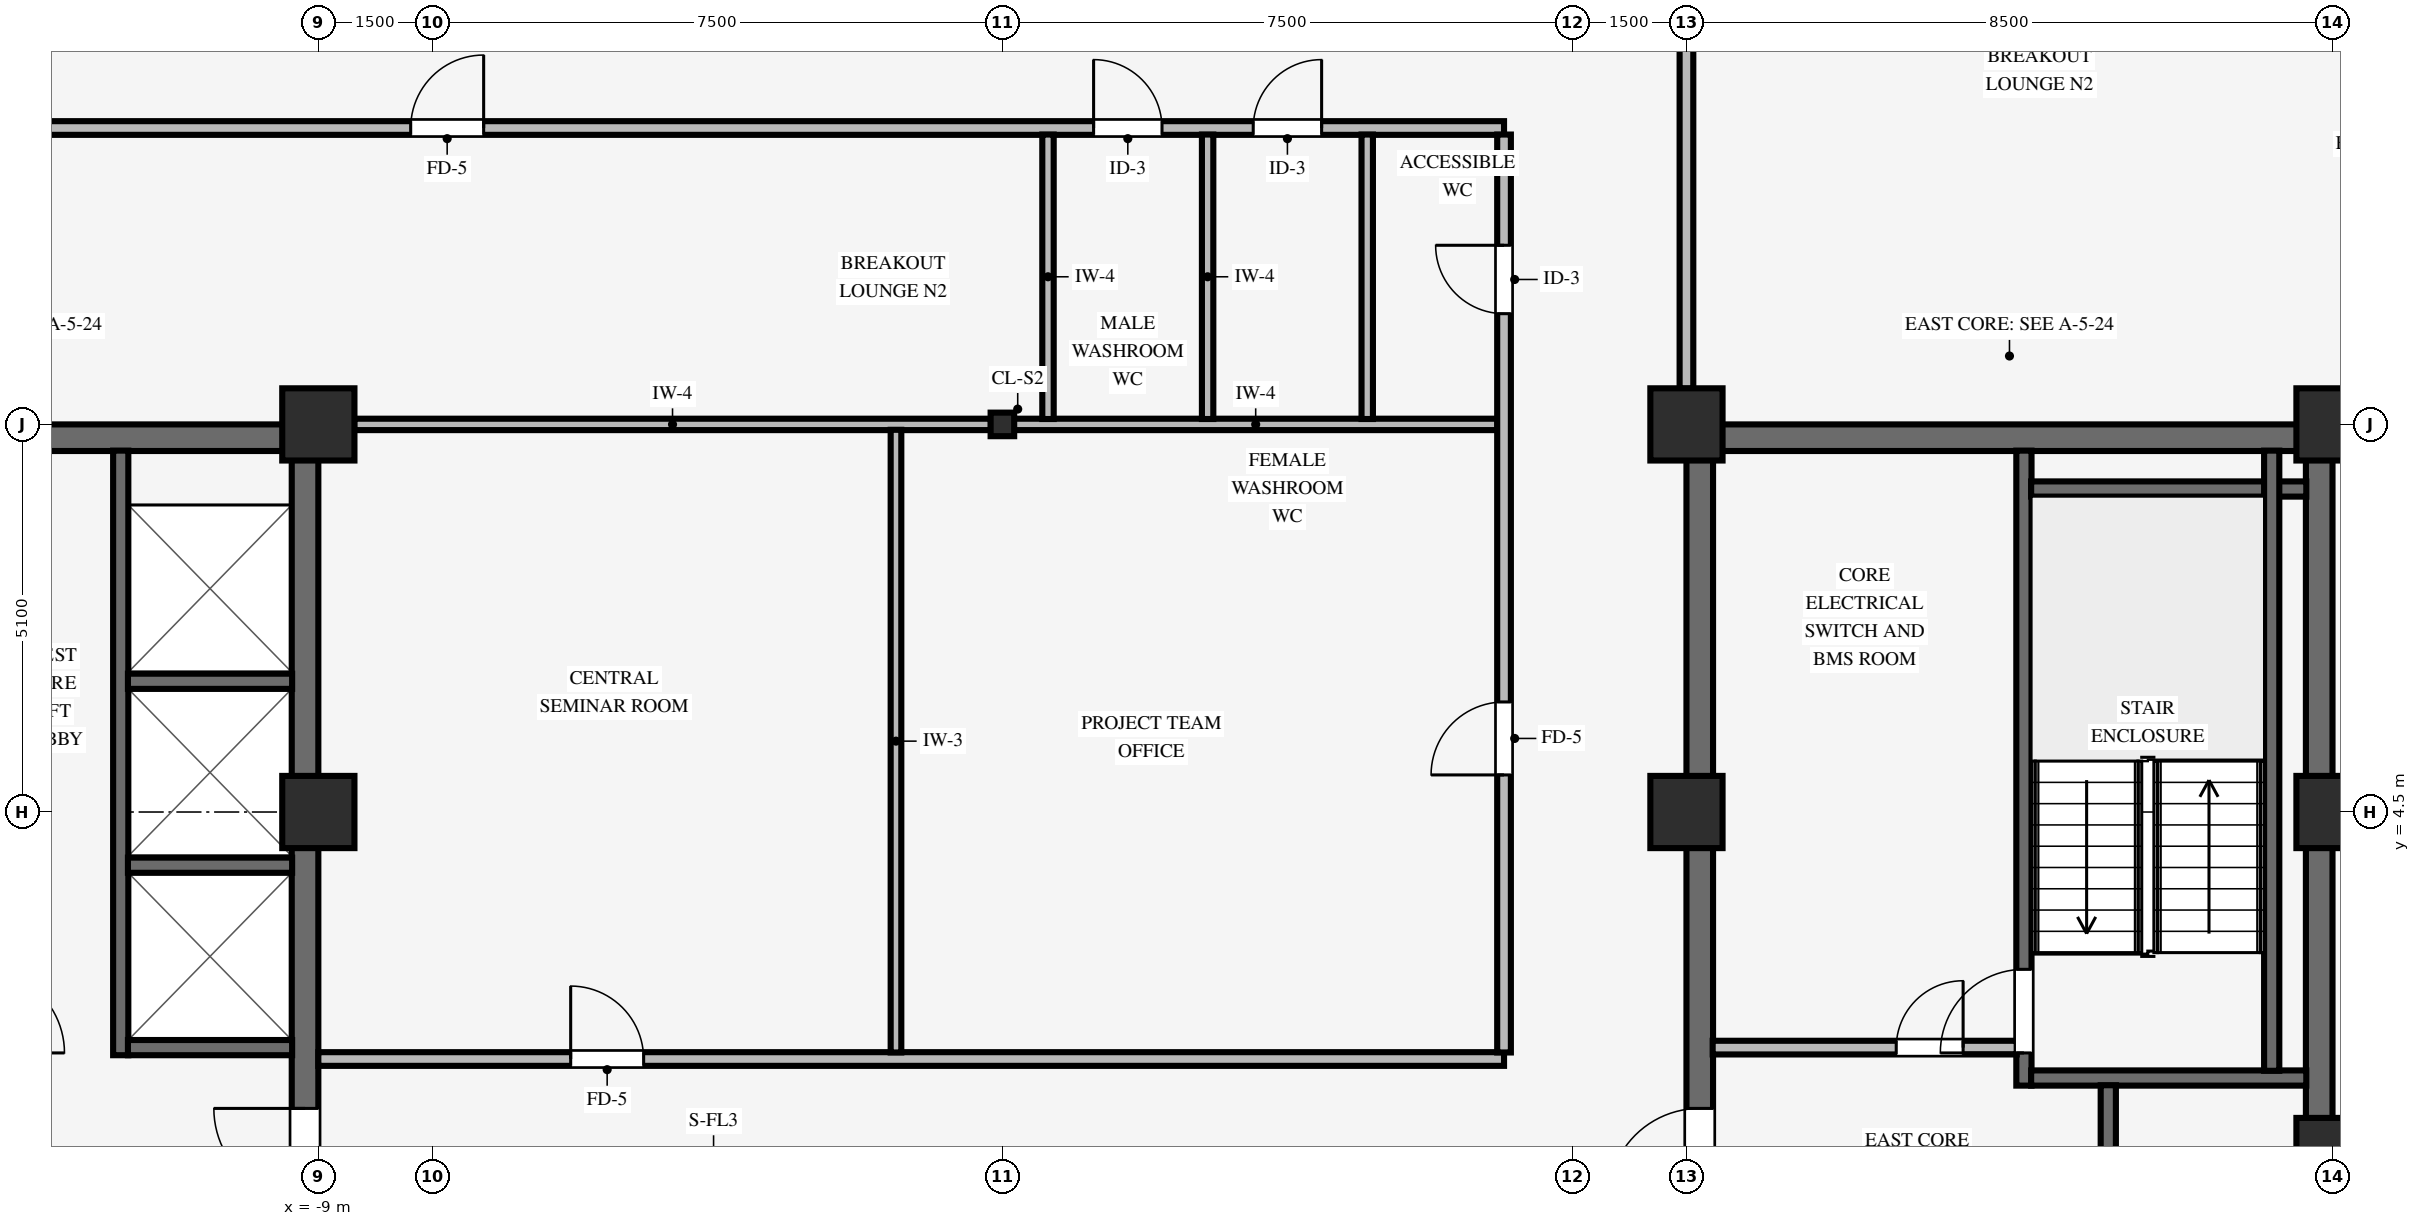
"""IFC4 building model, lengths in metres.
Left out: names, types, materials, properties, quantities, classifications, styles, units other than length and angle.
Written with IfcOpenShell. Run it as: python <this file> out.ifc"""

import sys

from ifc_helpers import new_model, si_unit, direction, frame, frame_2d, origin, origin_2d, place, context, subcontext, project, spatial, rectangle, i_section, extrude, source, transform, mapped, element, fill, save


model = new_model("IFC4")
c1 = context("Model", 3, precision=1e-05, world=origin(), true_north=direction((0.0, 1.0)))
c2 = subcontext(c1, "Body", "Model", "MODEL_VIEW")
j1 = project(units=[si_unit("LENGTHUNIT", "METRE"), si_unit("PLANEANGLEUNIT", "RADIAN")], contexts=[c1])
p1 = place(None, origin())
s1 = spatial("IfcSite", under=j1, at=p1, CompositionType="ELEMENT")
p2 = place(p1, origin())
s2 = spatial("IfcBuilding", under=s1, at=p2, CompositionType="ELEMENT")
p3 = place(p2, frame((0.0, 0.0, 209.15)))
s3 = spatial("IfcBuildingStorey", under=s2, at=p3, CompositionType="ELEMENT", Elevation=209.15)
p4 = place(p3, frame((-17.5, 9.425, 0.0), z_axis=(0.0, 0.0, 1.0), x_axis=(1.0, 0.0, 0.0)))
e1 = element("IfcWall", 1, at=p4, inside=s3, PredefinedType="SHEAR", context=c2, shape_type="SweptSolid", body=[
    extrude(rectangle(XDim=8.5, YDim=0.35, at=frame_2d((4.25, 0.0))), origin(), (0.0, 0.0, 1.0), 3.37),
])
p5 = place(p3, frame((-9.175, -9.255, 0.0), z_axis=(0.0, 0.0, 1.0), x_axis=(0.0, 1.0, 0.0)))
e2 = element("IfcWall", 2, at=p5, inside=s3, PredefinedType="SHEAR", context=c2, shape_type="SweptSolid", body=[
    extrude(rectangle(XDim=18.51, YDim=0.35, at=frame_2d((9.255, 0.0))), origin(), (0.0, 0.0, 1.0), 3.37),
])
p6 = place(p5, frame((8.655, 0.0, 0.0)))
e3 = element("IfcOpeningElement", 3, at=p6, cuts=e2, PredefinedType="OPENING", context=c2, shape_type="SweptSolid", body=[
    extrude(rectangle(XDim=1.2, YDim=2.15, at=frame_2d((0.6, 1.075))), frame((0.0, 0.185, 0.0), z_axis=(0.0, -1.0, 0.0), x_axis=(1.0, 0.0, 0.0)), (0.0, 0.0, 1.0), 0.37),
])
p7 = place(p3, frame((9.0, 9.425, 0.0), z_axis=(0.0, 0.0, 1.0), x_axis=(1.0, 0.0, 0.0)))
e4 = element("IfcWall", 4, at=p7, inside=s3, PredefinedType="SHEAR", context=c2, shape_type="SweptSolid", body=[
    extrude(rectangle(XDim=8.5, YDim=0.35, at=frame_2d((4.25, 0.0))), origin(), (0.0, 0.0, 1.0), 3.37),
])
p8 = place(p3, frame((9.175, -9.255, 0.0), z_axis=(0.0, 0.0, 1.0), x_axis=(0.0, 1.0, 0.0)))
e5 = element("IfcWall", 5, at=p8, inside=s3, PredefinedType="SHEAR", context=c2, shape_type="SweptSolid", body=[
    extrude(rectangle(XDim=18.51, YDim=0.35, at=frame_2d((9.255, 0.0))), origin(), (0.0, 0.0, 1.0), 3.37),
])
p9 = place(p8, frame((8.655, 0.0, 0.0)))
e6 = element("IfcOpeningElement", 6, at=p9, cuts=e5, PredefinedType="OPENING", context=c2, shape_type="SweptSolid", body=[
    extrude(rectangle(XDim=1.2, YDim=2.15, at=frame_2d((0.6, 1.075))), frame((0.0, 0.185, 0.0), z_axis=(0.0, -1.0, 0.0), x_axis=(1.0, 0.0, 0.0)), (0.0, 0.0, 1.0), 0.37),
])
p10 = place(p3, frame((17.325, -9.255, 0.0), z_axis=(0.0, 0.0, 1.0), x_axis=(0.0, 1.0, 0.0)))
e7 = element("IfcWall", 7, at=p10, inside=s3, PredefinedType="SHEAR", context=c2, shape_type="SweptSolid", body=[
    extrude(rectangle(XDim=18.51, YDim=0.35, at=frame_2d((9.255, 0.0))), origin(), (0.0, 0.0, 1.0), 3.37),
])
for number, where, z_axis, x_axis in (
    (8, (-9.0, 4.5, 0.0), (0.0, 0.0, 1.0), (1.0, 0.0, 0.0)),
    (9, (-9.0, 9.6, 0.0), (0.0, 0.0, 1.0), (1.0, 0.0, 0.0)),
    (10, (9.0, 4.5, 0.0), (0.0, 0.0, 1.0), (1.0, 0.0, 0.0)),
    (11, (9.0, 9.6, 0.0), (0.0, 0.0, 1.0), (1.0, 0.0, 0.0)),
    (12, (17.5, 4.5, 0.0), (0.0, 0.0, 1.0), (1.0, 0.0, 0.0)),
    (13, (17.5, 9.6, 0.0), (0.0, 0.0, 1.0), (1.0, 0.0, 0.0)),
    (14, (17.5, 0.0, 0.0), (0.0, 0.0, 1.0), (1.0, 0.0, 0.0)),
):
    element("IfcColumn", number, at=place(p3, frame(where, z_axis=z_axis, x_axis=x_axis)), inside=s3, PredefinedType="COLUMN", context=c2, shape_type="SweptSolid", body=[
        extrude(rectangle(XDim=0.95, YDim=0.95, at=origin_2d()), origin(), (0.0, 0.0, 1.0), 3.37),
    ])
p11 = place(p3, frame((0.0, 9.6, 0.0), z_axis=(0.0, 0.0, 1.0), x_axis=(1.0, 0.0, 0.0)))
e15 = element("IfcColumn", 15, at=p11, inside=s3, PredefinedType="COLUMN", context=c2, shape_type="SweptSolid", body=[
    extrude(i_section(OverallWidth=0.31, OverallDepth=0.31, WebThickness=0.015, FlangeThickness=0.015, FilletRadius=0.015, at=origin_2d()), origin(), (0.0, 0.0, 1.0), 3.37),
])
p12 = place(p3, frame((-11.6, 1.3, 0.0), z_axis=(0.0, 0.0, 1.0), x_axis=(0.0, 1.0, 0.0)))
e16 = element("IfcWall", 16, at=p12, inside=s3, PredefinedType="SHEAR", context=c2, shape_type="SweptSolid", body=[
    extrude(rectangle(XDim=7.955, YDim=0.2, at=frame_2d((3.978, 0.0))), origin(), (0.0, 0.0, 1.0), 3.37),
])
for number, where, z_axis, x_axis in (
    (17, (-11.505, 1.4, 0.0), (0.0, 0.0, 1.0), (1.0, 0.0, 0.0)),
    (18, (-11.505, 3.8, 0.0), (0.0, 0.0, 1.0), (1.0, 0.0, 0.0)),
    (19, (-11.505, 6.22, 0.0), (0.0, 0.0, 1.0), (1.0, 0.0, 0.0)),
):
    element("IfcWall", number, at=place(p3, frame(where, z_axis=z_axis, x_axis=x_axis)), inside=s3, PredefinedType="SHEAR", context=c2, shape_type="SweptSolid", body=[
        extrude(rectangle(XDim=2.16, YDim=0.2, at=frame_2d((1.08, 0.0))), origin(), (0.0, 0.0, 1.0), 3.37),
    ])
p13 = place(p3, frame((13.44, 0.9, 0.0), z_axis=(0.0, 0.0, 1.0), x_axis=(0.0, 1.0, 0.0)))
e20 = element("IfcWall", 20, at=p13, inside=s3, PredefinedType="SHEAR", context=c2, shape_type="SweptSolid", body=[
    extrude(rectangle(XDim=8.355, YDim=0.2, at=frame_2d((4.177, 0.0))), origin(), (0.0, 0.0, 1.0), 3.37),
])
p14 = place(p13, frame((0.43, 0.0, 0.0)))
e21 = element("IfcOpeningElement", 21, at=p14, cuts=e20, PredefinedType="OPENING", context=c2, shape_type="SweptSolid", body=[
    extrude(rectangle(XDim=1.1, YDim=2.15, at=frame_2d((0.55, 1.075))), frame((0.0, 0.11, 0.0), z_axis=(0.0, -1.0, 0.0), x_axis=(1.0, 0.0, 0.0)), (0.0, 0.0, 1.0), 0.22),
])
for number, where, z_axis, x_axis in (
    (22, (13.535, 1.0, 0.0), (0.0, 0.0, 1.0), (1.0, 0.0, 0.0)),
    (23, (13.535, 8.75, 0.0), (0.0, 0.0, 1.0), (1.0, 0.0, 0.0)),
):
    element("IfcWall", number, at=place(p3, frame(where, z_axis=z_axis, x_axis=x_axis)), inside=s3, PredefinedType="SHEAR", context=c2, shape_type="SweptSolid", body=[
        extrude(rectangle(XDim=3.62, YDim=0.2, at=frame_2d((1.81, 0.0))), origin(), (0.0, 0.0, 1.0), 3.37),
    ])
p15 = place(p3, frame((16.7, 1.095, 0.0), z_axis=(0.0, 0.0, 1.0), x_axis=(0.0, 1.0, 0.0)))
e24 = element("IfcWall", 24, at=p15, inside=s3, PredefinedType="SHEAR", context=c2, shape_type="SweptSolid", body=[
    extrude(rectangle(XDim=8.16, YDim=0.2, at=frame_2d((4.08, 0.0))), origin(), (0.0, 0.0, 1.0), 3.37),
])
p16 = place(p3, frame((14.55, -9.255, 0.0), z_axis=(0.0, 0.0, 1.0), x_axis=(0.0, 1.0, 0.0)))
e25 = element("IfcWall", 25, at=p16, inside=s3, PredefinedType="SHEAR", context=c2, shape_type="SweptSolid", body=[
    extrude(rectangle(XDim=10.16, YDim=0.2, at=frame_2d((5.08, 0.0))), origin(), (0.0, 0.0, 1.0), 3.37),
])
p17 = place(p16, frame((6.615, 0.0, 0.0)))
e26 = element("IfcOpeningElement", 26, at=p17, cuts=e25, PredefinedType="OPENING", context=c2, shape_type="SweptSolid", body=[
    extrude(rectangle(XDim=0.88, YDim=2.1, at=frame_2d((0.44, 1.05))), frame((0.0, 0.11, 0.0), z_axis=(0.0, -1.0, 0.0), x_axis=(1.0, 0.0, 0.0)), (0.0, 0.0, 1.0), 0.22),
])
p18 = place(p16, frame((0.98, 0.0, 0.0)))
e27 = element("IfcOpeningElement", 27, at=p18, cuts=e25, PredefinedType="OPENING", context=c2, shape_type="SweptSolid", body=[
    extrude(rectangle(XDim=1.15, YDim=2.15, at=frame_2d((0.575, 1.075))), frame((0.0, 0.11, 0.0), z_axis=(0.0, -1.0, 0.0), x_axis=(1.0, 0.0, 0.0)), (0.0, 0.0, 1.0), 0.22),
])
p19 = place(p3, frame((9.345, 1.4, 0.0), z_axis=(0.0, 0.0, 1.0), x_axis=(1.0, 0.0, 0.0)))
e28 = element("IfcWall", 28, at=p19, inside=s3, PredefinedType="PARTITIONING", context=c2, shape_type="SweptSolid", body=[
    extrude(rectangle(XDim=4.0, YDim=0.18, at=frame_2d((2.0, 0.0))), origin(), (0.0, 0.0, 1.0), 3.36),
])
p20 = place(p19, frame((2.415, 0.0, 0.0)))
e29 = element("IfcOpeningElement", 29, at=p20, cuts=e28, PredefinedType="OPENING", context=c2, shape_type="SweptSolid", body=[
    extrude(rectangle(XDim=0.88, YDim=2.1, at=frame_2d((0.44, 1.05))), frame((0.0, 0.1, 0.0), z_axis=(0.0, -1.0, 0.0), x_axis=(1.0, 0.0, 0.0)), (0.0, 0.0, 1.0), 0.2),
])
p21 = place(p3, frame((-9.0, 1.25, 0.0), z_axis=(0.0, 0.0, 1.0), x_axis=(1.0, 0.0, 0.0)))
e30 = element("IfcWall", 30, at=p21, inside=s3, PredefinedType="PARTITIONING", context=c2, shape_type="SweptSolid", body=[
    extrude(rectangle(XDim=15.6, YDim=0.18, at=frame_2d((7.8, 0.0))), origin(), (0.0, 0.0, 1.0), 3.36),
])
p22 = place(p21, frame((3.32, 0.0, 0.0)))
e31 = element("IfcOpeningElement", 31, at=p22, cuts=e30, PredefinedType="OPENING", context=c2, shape_type="SweptSolid", body=[
    extrude(rectangle(XDim=0.96, YDim=2.1, at=frame_2d((0.48, 1.05))), frame((0.0, 0.1, 0.0), z_axis=(0.0, -1.0, 0.0), x_axis=(1.0, 0.0, 0.0)), (0.0, 0.0, 1.0), 0.2),
])
p23 = place(p3, frame((-8.529, 9.6, 0.0), z_axis=(0.0, 0.0, 1.0), x_axis=(1.0, 0.0, 0.0)))
e32 = element("IfcWall", 32, at=p23, inside=s3, PredefinedType="PARTITIONING", context=c2, shape_type="SweptSolid", body=[
    extrude(rectangle(XDim=8.378, YDim=0.15, at=frame_2d((4.189, 0.0))), origin(), (0.0, 0.0, 1.0), 2.405),
])
p24 = place(p3, frame((0.151, 9.6, 0.0), z_axis=(0.0, 0.0, 1.0), x_axis=(1.0, 0.0, 0.0)))
e33 = element("IfcWall", 33, at=p24, inside=s3, PredefinedType="PARTITIONING", context=c2, shape_type="SweptSolid", body=[
    extrude(rectangle(XDim=6.363, YDim=0.15, at=frame_2d((3.182, 0.0))), origin(), (0.0, 0.0, 1.0), 2.405),
])
p25 = place(p3, frame((-17.7, 13.5, 0.0), z_axis=(0.0, 0.0, 1.0), x_axis=(1.0, 0.0, 0.0)))
e34 = element("IfcWall", 34, at=p25, inside=s3, PredefinedType="PARTITIONING", context=c2, shape_type="SweptSolid", body=[
    extrude(rectangle(XDim=24.3, YDim=0.18, at=frame_2d((12.15, 0.0))), origin(), (0.0, 0.0, 1.0), 3.008),
])
p26 = place(p25, frame((9.915, 0.0, 0.0)))
e35 = element("IfcOpeningElement", 35, at=p26, cuts=e34, PredefinedType="OPENING", context=c2, shape_type="SweptSolid", body=[
    extrude(rectangle(XDim=0.96, YDim=2.1, at=frame_2d((0.48, 1.05))), frame((0.0, 0.1, 0.0), z_axis=(0.0, -1.0, 0.0), x_axis=(1.0, 0.0, 0.0)), (0.0, 0.0, 1.0), 0.2),
])
p27 = place(p25, frame((18.9, 0.0, 0.0)))
e36 = element("IfcOpeningElement", 36, at=p27, cuts=e34, PredefinedType="OPENING", context=c2, shape_type="SweptSolid", body=[
    extrude(rectangle(XDim=0.9, YDim=2.1, at=frame_2d((0.45, 1.05))), frame((0.0, 0.1, 0.0), z_axis=(0.0, -1.0, 0.0), x_axis=(1.0, 0.0, 0.0)), (0.0, 0.0, 1.0), 0.2),
])
p28 = place(p25, frame((21.0, 0.0, 0.0)))
e37 = element("IfcOpeningElement", 37, at=p28, cuts=e34, PredefinedType="OPENING", context=c2, shape_type="SweptSolid", body=[
    extrude(rectangle(XDim=0.9, YDim=2.1, at=frame_2d((0.45, 1.05))), frame((0.0, 0.1, 0.0), z_axis=(0.0, -1.0, 0.0), x_axis=(1.0, 0.0, 0.0)), (0.0, 0.0, 1.0), 0.2),
])
p29 = place(p3, frame((-1.4, 1.336, 0.0), z_axis=(0.0, 0.0, 1.0), x_axis=(0.0, 1.0, 0.0)))
e38 = element("IfcWall", 38, at=p29, inside=s3, PredefinedType="PARTITIONING", context=c2, shape_type="SweptSolid", body=[
    extrude(rectangle(XDim=8.193, YDim=0.14, at=frame_2d((4.097, 0.0))), origin(), (0.0, 0.0, 1.0), 3.36),
])
for number, where, z_axis, x_axis in (
    (39, (0.6, 9.671, 0.0), (0.0, 0.0, 1.0), (0.0, 1.0, 0.0)),
    (40, (2.7, 9.671, 0.0), (0.0, 0.0, 1.0), (0.0, 1.0, 0.0)),
    (41, (4.8, 9.671, 0.0), (0.0, 0.0, 1.0), (0.0, 1.0, 0.0)),
):
    element("IfcWall", number, at=place(p3, frame(where, z_axis=z_axis, x_axis=x_axis)), inside=s3, PredefinedType="PARTITIONING", context=c2, shape_type="SweptSolid", body=[
        extrude(rectangle(XDim=3.743, YDim=0.15, at=frame_2d((1.872, 0.0))), origin(), (0.0, 0.0, 1.0), 3.36),
    ])
p30 = place(p3, frame((6.6, 1.336, 0.0), z_axis=(0.0, 0.0, 1.0), x_axis=(0.0, 1.0, 0.0)))
e42 = element("IfcWall", 42, at=p30, inside=s3, PredefinedType="PARTITIONING", context=c2, shape_type="SweptSolid", body=[
    extrude(rectangle(XDim=12.078, YDim=0.18, at=frame_2d((6.039, 0.0))), origin(), (0.0, 0.0, 1.0), 3.36),
])
p31 = place(p30, frame((3.652, 0.0, 0.0)))
e43 = element("IfcOpeningElement", 43, at=p31, cuts=e42, PredefinedType="OPENING", context=c2, shape_type="SweptSolid", body=[
    extrude(rectangle(XDim=0.96, YDim=2.1, at=frame_2d((0.48, 1.05))), frame((0.0, 0.1, 0.0), z_axis=(0.0, -1.0, 0.0), x_axis=(1.0, 0.0, 0.0)), (0.0, 0.0, 1.0), 0.2),
])
p32 = place(p30, frame((9.721, 0.0, 0.0)))
e44 = element("IfcOpeningElement", 44, at=p32, cuts=e42, PredefinedType="OPENING", context=c2, shape_type="SweptSolid", body=[
    extrude(rectangle(XDim=0.9, YDim=2.1, at=frame_2d((0.45, 1.05))), frame((0.0, 0.1, 0.0), z_axis=(0.0, -1.0, 0.0), x_axis=(1.0, 0.0, 0.0)), (0.0, 0.0, 1.0), 0.2),
])
p33 = place(p3, frame((9.0, 10.071, 0.0), z_axis=(0.0, 0.0, 1.0), x_axis=(0.0, 1.0, 0.0)))
e45 = element("IfcWall", 45, at=p33, inside=s3, PredefinedType="PARTITIONING", context=c2, shape_type="SweptSolid", body=[
    extrude(rectangle(XDim=5.743, YDim=0.18, at=frame_2d((2.872, 0.0))), origin(), (0.0, 0.0, 1.0), 2.816),
])
m1 = source(origin(), c2, "Body", "SweptSolid", [
    extrude(rectangle(XDim=1.1, YDim=2.15, at=frame_2d((0.55, 1.075))), frame((0.0, 0.025, 0.0), z_axis=(0.0, -1.0, 0.0), x_axis=(1.0, 0.0, 0.0)), (0.0, 0.0, 1.0), 0.05),
])
p34 = place(p14, origin())
e46 = element("IfcDoor", 46, at=p34, inside=s3, OperationType="SINGLE_SWING_LEFT", PredefinedType="DOOR", context=c2, shape_type="MappedRepresentation", body=[
    mapped(m1, transform((0.0, 0.0, 0.0), scale=1.0)),
])
fill(e21, e46)
m2 = source(origin(), c2, "Body", "SweptSolid", [
    extrude(rectangle(XDim=1.2, YDim=2.15, at=frame_2d((0.6, 1.075))), frame((0.0, 0.025, 0.0), z_axis=(0.0, -1.0, 0.0), x_axis=(1.0, 0.0, 0.0)), (0.0, 0.0, 1.0), 0.05),
])
p35 = place(p6, origin())
e47 = element("IfcDoor", 47, at=p35, inside=s3, OperationType="SINGLE_SWING_RIGHT", PredefinedType="DOOR", context=c2, shape_type="MappedRepresentation", body=[
    mapped(m2, transform((0.0, 0.0, 0.0), scale=1.0)),
])
fill(e3, e47)
p36 = place(p9, origin())
e48 = element("IfcDoor", 48, at=p36, inside=s3, OperationType="SINGLE_SWING_LEFT", PredefinedType="DOOR", context=c2, shape_type="MappedRepresentation", body=[
    mapped(m2, transform((0.0, 0.0, 0.0), scale=1.0)),
])
fill(e6, e48)
m3 = source(origin(), c2, "Body", "SweptSolid", [
    extrude(rectangle(XDim=0.88, YDim=2.1, at=frame_2d((0.44, 1.05))), frame((0.0, 0.025, 0.0), z_axis=(0.0, -1.0, 0.0), x_axis=(1.0, 0.0, 0.0)), (0.0, 0.0, 1.0), 0.05),
])
p37 = place(p20, origin())
e49 = element("IfcDoor", 49, at=p37, inside=s3, OperationType="SINGLE_SWING_RIGHT", PredefinedType="DOOR", context=c2, shape_type="MappedRepresentation", body=[
    mapped(m3, transform((0.0, 0.0, 0.0), scale=1.0)),
])
fill(e29, e49)
m4 = source(origin(), c2, "Body", "SweptSolid", [
    extrude(rectangle(XDim=0.96, YDim=2.1, at=frame_2d((0.48, 1.05))), frame((0.0, 0.025, 0.0), z_axis=(0.0, -1.0, 0.0), x_axis=(1.0, 0.0, 0.0)), (0.0, 0.0, 1.0), 0.05),
])
p38 = place(p26, origin())
e50 = element("IfcDoor", 50, at=p38, inside=s3, OperationType="SINGLE_SWING_RIGHT", PredefinedType="DOOR", context=c2, shape_type="MappedRepresentation", body=[
    mapped(m4, transform((0.0, 0.0, 0.0), scale=1.0)),
])
fill(e35, e50)
p39 = place(p31, origin())
e51 = element("IfcDoor", 51, at=p39, inside=s3, OperationType="SINGLE_SWING_LEFT", PredefinedType="DOOR", context=c2, shape_type="MappedRepresentation", body=[
    mapped(m4, transform((0.0, 0.0, 0.0), scale=1.0)),
])
fill(e43, e51)
p40 = place(p22, origin())
e52 = element("IfcDoor", 52, at=p40, inside=s3, OperationType="SINGLE_SWING_LEFT", PredefinedType="DOOR", context=c2, shape_type="MappedRepresentation", body=[
    mapped(m4, transform((0.0, 0.0, 0.0), scale=1.0)),
])
fill(e31, e52)
m5 = source(origin(), c2, "Body", "SweptSolid", [
    extrude(rectangle(XDim=0.9, YDim=2.1, at=frame_2d((0.45, 1.05))), frame((0.0, 0.025, 0.0), z_axis=(0.0, -1.0, 0.0), x_axis=(1.0, 0.0, 0.0)), (0.0, 0.0, 1.0), 0.05),
])
p41 = place(p32, origin())
e53 = element("IfcDoor", 53, at=p41, inside=s3, OperationType="SINGLE_SWING_RIGHT", PredefinedType="DOOR", context=c2, shape_type="MappedRepresentation", body=[
    mapped(m5, transform((0.0, 0.0, 0.0), scale=1.0)),
])
fill(e44, e53)
p42 = place(p27, origin())
e54 = element("IfcDoor", 54, at=p42, inside=s3, OperationType="SINGLE_SWING_LEFT", PredefinedType="DOOR", context=c2, shape_type="MappedRepresentation", body=[
    mapped(m5, transform((0.0, 0.0, 0.0), scale=1.0)),
])
fill(e36, e54)
p43 = place(p28, origin())
e55 = element("IfcDoor", 55, at=p43, inside=s3, OperationType="SINGLE_SWING_RIGHT", PredefinedType="DOOR", context=c2, shape_type="MappedRepresentation", body=[
    mapped(m5, transform((0.0, 0.0, 0.0), scale=1.0)),
])
fill(e37, e55)
save(model, sys.argv[1])
